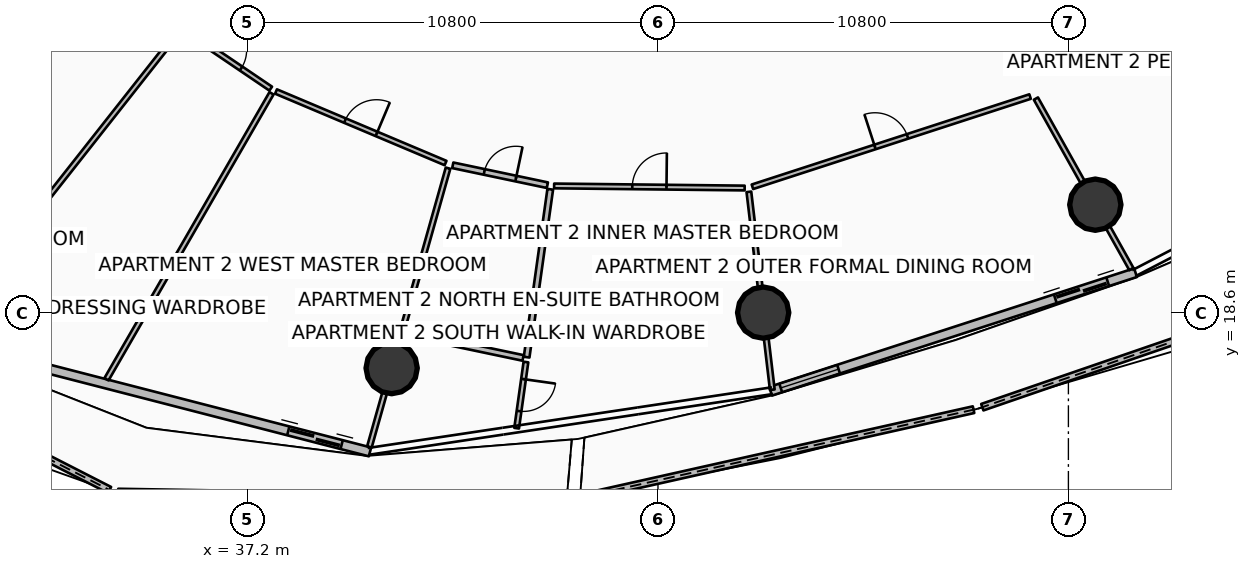
"""IFC4 building model, lengths in metres.
Left out: names, types, materials, properties, quantities, classifications, styles, units other than length and angle.
Written with IfcOpenShell. Run it as: python <this file> out.ifc"""

import sys

from ifc_helpers import new_model, si_unit, direction, frame, frame_2d, origin, origin_2d, place, context, subcontext, project, spatial, polyline, rectangle, circle, outline, extrude, element, fill, save


model = new_model("IFC4")
c1 = context("Model", 3, precision=1e-05, world=origin(), true_north=direction((0.0, 1.0)))
c2 = subcontext(c1, "Body", "Model", "MODEL_VIEW")
j1 = project(units=[si_unit("LENGTHUNIT", "METRE"), si_unit("PLANEANGLEUNIT", "RADIAN")], contexts=[c1])
p1 = place(None, origin())
s1 = spatial("IfcSite", under=j1, at=p1, CompositionType="ELEMENT")
p2 = place(p1, origin())
s2 = spatial("IfcBuilding", under=s1, at=p2, CompositionType="ELEMENT")
p3 = place(p2, frame((0.0, 0.0, 33.9)))
s3 = spatial("IfcBuildingStorey", under=s2, at=p3, CompositionType="ELEMENT", Elevation=33.9)
for number, where, z_axis, x_axis in (
    (1, (40.992, 17.151, 0.0), (0.0, 0.0, 1.0), (1.0, 0.0, 0.0)),
    (2, (50.768, 18.611, 0.0), (0.0, 0.0, 1.0), (1.0, 0.0, 0.0)),
    (3, (59.508, 21.45, 0.0), (0.0, 0.0, 1.0), (1.0, 0.0, 0.0)),
):
    element("IfcColumn", number, at=place(p3, frame(where, z_axis=z_axis, x_axis=x_axis)), inside=s3, PredefinedType="COLUMN", context=c2, shape_type="SweptSolid", body=[
        extrude(circle(Radius=0.675, at=origin_2d()), origin(), (0.0, 0.0, 1.0), 3.5),
    ])
p4 = place(p3, frame((22.246, 19.731, 0.0), z_axis=(0.0, 0.0, 1.0), x_axis=(0.890402176463, -0.455174652359, 0.0)))
e4 = element("IfcWall", 4, at=p4, inside=s3, PredefinedType="PARAPET", context=c2, shape_type="SweptSolid", body=[
    extrude(outline(polyline([(0.0, 0.0), (12.717, 0.0), (12.717, 1.348), (6.358, 1.562), (0.0, 1.747), (0.0, 0.0)])), frame((0.0, 0.09, 0.0), z_axis=(0.0, -1.0, 0.0), x_axis=(1.0, 0.0, 0.0)), (0.0, 0.0, 1.0), 0.18),
])
p5 = place(p3, frame((33.796, 13.886, 0.0), z_axis=(0.0, 0.0, 1.0), x_axis=(0.999855793441, -0.016982117721, 0.0)))
e5 = element("IfcWall", 5, at=p5, inside=s3, PredefinedType="PARAPET", context=c2, shape_type="SweptSolid", body=[
    extrude(outline(polyline([(0.0, 0.0), (11.803, 0.0), (11.803, 1.12), (5.902, 1.182), (0.0, 1.348), (0.0, 0.0)])), frame((0.0, 0.09, 0.0), z_axis=(0.0, -1.0, 0.0), x_axis=(1.0, 0.0, 0.0)), (0.0, 0.0, 1.0), 0.18),
])
p6 = place(p3, frame((45.949, 13.739, 0.0), z_axis=(0.0, 0.0, 1.0), x_axis=(0.975844238529, 0.218467439518, 0.0)))
e6 = element("IfcWall", 6, at=p6, inside=s3, PredefinedType="PARAPET", context=c2, shape_type="SweptSolid", body=[
    extrude(outline(polyline([(0.0, 0.0), (10.611, 0.0), (10.611, 1.348), (5.305, 1.182), (0.0, 1.12), (0.0, 0.0)])), frame((0.0, 0.09, 0.0), z_axis=(0.0, -1.0, 0.0), x_axis=(1.0, 0.0, 0.0)), (0.0, 0.0, 1.0), 0.18),
])
p7 = place(p3, frame((56.534, 16.122, 0.0), z_axis=(0.0, 0.0, 1.0), x_axis=(0.945564712315, 0.325434132851, 0.0)))
e7 = element("IfcWall", 7, at=p7, inside=s3, PredefinedType="PARAPET", context=c2, shape_type="SweptSolid", body=[
    extrude(outline(polyline([(0.0, 0.0), (10.897, 0.0), (10.897, 1.747), (5.448, 1.562), (0.0, 1.348), (0.0, 0.0)])), frame((0.0, 0.09, 0.0), z_axis=(0.0, -1.0, 0.0), x_axis=(1.0, 0.0, 0.0)), (0.0, 0.0, 1.0), 0.18),
])
p8 = place(p3, frame((28.946, 17.904, 0.0), z_axis=(0.0, 0.0, 1.0), x_axis=(0.96833871487, -0.249640007378, 0.0)))
e8 = element("IfcWall", 8, at=p8, inside=s3, PredefinedType="SOLIDWALL", context=c2, shape_type="SweptSolid", body=[
    extrude(rectangle(XDim=11.851, YDim=0.24, at=frame_2d((5.926, 0.0))), origin(), (0.0, 0.0, 1.0), 2.45),
])
p9 = place(p8, frame((9.631, 0.0, 0.0)))
e9 = element("IfcOpeningElement", 9, at=p9, cuts=e8, PredefinedType="OPENING", context=c2, shape_type="SweptSolid", body=[
    extrude(rectangle(XDim=1.45, YDim=2.15, at=frame_2d((0.725, 1.075))), frame((0.0, 0.13, 0.0), z_axis=(0.0, -1.0, 0.0), x_axis=(1.0, 0.0, 0.0)), (0.0, 0.0, 1.0), 0.26),
])
p10 = place(p8, frame((0.28, 0.0, 0.65)))
e10 = element("IfcOpeningElement", 10, at=p10, cuts=e8, PredefinedType="OPENING", context=c2, shape_type="SweptSolid", body=[
    extrude(rectangle(XDim=1.6, YDim=1.5, at=frame_2d((0.8, 0.75))), frame((0.0, 0.13, 0.0), z_axis=(0.0, -1.0, 0.0), x_axis=(1.0, 0.0, 0.0)), (0.0, 0.0, 1.0), 0.26),
])
p11 = place(p3, frame((50.964, 16.542, 0.0), z_axis=(0.0, 0.0, 1.0), x_axis=(0.951054679225, 0.309022648238, 0.0)))
e11 = element("IfcWall", 11, at=p11, inside=s3, PredefinedType="SOLIDWALL", context=c2, shape_type="SweptSolid", body=[
    extrude(rectangle(XDim=10.097, YDim=0.24, at=frame_2d((5.048, 0.0))), origin(), (0.0, 0.0, 1.0), 2.45),
])
p12 = place(p11, frame((7.877, 0.0, 0.0)))
e12 = element("IfcOpeningElement", 12, at=p12, cuts=e11, PredefinedType="OPENING", context=c2, shape_type="SweptSolid", body=[
    extrude(rectangle(XDim=1.45, YDim=2.15, at=frame_2d((0.725, 1.075))), frame((0.0, 0.13, 0.0), z_axis=(0.0, -1.0, 0.0), x_axis=(1.0, 0.0, 0.0)), (0.0, 0.0, 1.0), 0.26),
])
p13 = place(p11, frame((0.28, 0.0, 0.65)))
e13 = element("IfcOpeningElement", 13, at=p13, cuts=e11, PredefinedType="OPENING", context=c2, shape_type="SweptSolid", body=[
    extrude(rectangle(XDim=1.6, YDim=1.5, at=frame_2d((0.8, 0.75))), frame((0.0, 0.13, 0.0), z_axis=(0.0, -1.0, 0.0), x_axis=(1.0, 0.0, 0.0)), (0.0, 0.0, 1.0), 0.26),
])
p14 = place(p3, frame((33.291, 27.947, 0.0), z_axis=(0.0, 0.0, 1.0), x_axis=(-0.72304195697, -0.690804117287, 0.0)))
e14 = element("IfcWall", 14, at=p14, inside=s3, PredefinedType="PARTITIONING", context=c2, shape_type="SweptSolid", body=[
    extrude(rectangle(XDim=10.36, YDim=0.125, at=frame_2d((5.18, 0.0))), origin(), (0.0, 0.0, 1.0), 2.94),
])
p15 = place(p3, frame((35.4, 26.017, 0.0), z_axis=(0.0, 0.0, 1.0), x_axis=(-0.619085809847, -0.785323347447, 0.0)))
e15 = element("IfcWall", 15, at=p15, inside=s3, PredefinedType="PARTITIONING", context=c2, shape_type="SweptSolid", body=[
    extrude(rectangle(XDim=10.322, YDim=0.125, at=frame_2d((5.161, 0.0))), origin(), (0.0, 0.0, 1.0), 2.867),
])
p16 = place(p3, frame((37.831, 24.381, 0.0), z_axis=(0.0, 0.0, 1.0), x_axis=(-0.499878153527, -0.866095740451, 0.0)))
e16 = element("IfcWall", 16, at=p16, inside=s3, PredefinedType="PARTITIONING", context=c2, shape_type="SweptSolid", body=[
    extrude(rectangle(XDim=8.687, YDim=0.125, at=frame_2d((4.344, 0.0))), origin(), (0.0, 0.0, 1.0), 2.94),
])
p17 = place(p3, frame((35.544, 26.039, 0.0), z_axis=(0.0, 0.0, 1.0), x_axis=(0.827867904516, -0.560923107629, 0.0)))
e17 = element("IfcWall", 17, at=p17, inside=s3, PredefinedType="PARTITIONING", context=c2, shape_type="SweptSolid", body=[
    extrude(rectangle(XDim=2.736, YDim=0.125, at=frame_2d((1.368, 0.0))), origin(), (0.0, 0.0, 1.0), 2.867),
])
p18 = place(p17, frame((0.943, 0.0, 0.0)))
e18 = element("IfcOpeningElement", 18, at=p18, cuts=e17, PredefinedType="OPENING", context=c2, shape_type="SweptSolid", body=[
    extrude(rectangle(XDim=0.85, YDim=2.06, at=frame_2d((0.425, 1.03))), frame((0.0, 0.073, 0.0), z_axis=(0.0, -1.0, 0.0), x_axis=(1.0, 0.0, 0.0)), (0.0, 0.0, 1.0), 0.145),
])
p19 = place(p3, frame((37.949, 24.428, 0.0), z_axis=(0.0, 0.0, 1.0), x_axis=(0.921391247889, -0.388636293098, 0.0)))
e19 = element("IfcWall", 19, at=p19, inside=s3, PredefinedType="PARTITIONING", context=c2, shape_type="SweptSolid", body=[
    extrude(rectangle(XDim=4.842, YDim=0.125, at=frame_2d((2.421, 0.0))), origin(), (0.0, 0.0, 1.0), 2.867),
])
p20 = place(p19, frame((1.971, 0.0, 0.0)))
e20 = element("IfcOpeningElement", 20, at=p20, cuts=e19, PredefinedType="OPENING", context=c2, shape_type="SweptSolid", body=[
    extrude(rectangle(XDim=0.9, YDim=2.08, at=frame_2d((0.45, 1.04))), frame((0.0, 0.073, 0.0), z_axis=(0.0, -1.0, 0.0), x_axis=(1.0, 0.0, 0.0)), (0.0, 0.0, 1.0), 0.145),
])
p21 = place(p3, frame((42.475, 22.411, 0.0), z_axis=(0.0, 0.0, 1.0), x_axis=(-0.271439615814, -0.96245547168, 0.0)))
e21 = element("IfcWall", 21, at=p21, inside=s3, PredefinedType="PARTITIONING", context=c2, shape_type="SweptSolid", body=[
    extrude(rectangle(XDim=7.619, YDim=0.125, at=frame_2d((3.81, 0.0))), origin(), (0.0, 0.0, 1.0), 2.867),
])
p22 = place(p3, frame((42.6, 22.487, 0.0), z_axis=(0.0, 0.0, 1.0), x_axis=(0.978579306251, -0.20587020517, 0.0)))
e22 = element("IfcWall", 22, at=p22, inside=s3, PredefinedType="PARTITIONING", context=c2, shape_type="SweptSolid", body=[
    extrude(rectangle(XDim=2.544, YDim=0.15, at=frame_2d((1.272, 0.0))), origin(), (0.0, 0.0, 1.0), 2.867),
])
p23 = place(p22, frame((0.847, 0.0, 0.0)))
e23 = element("IfcOpeningElement", 23, at=p23, cuts=e22, PredefinedType="OPENING", context=c2, shape_type="SweptSolid", body=[
    extrude(rectangle(XDim=0.85, YDim=2.06, at=frame_2d((0.425, 1.03))), frame((0.0, 0.085, 0.0), z_axis=(0.0, -1.0, 0.0), x_axis=(1.0, 0.0, 0.0)), (0.0, 0.0, 1.0), 0.17),
])
p24 = place(p3, frame((41.354, 18.069, 0.0), z_axis=(0.0, 0.0, 1.0), x_axis=(0.978588253421, -0.205827671283, 0.0)))
e24 = element("IfcWall", 24, at=p24, inside=s3, PredefinedType="PARTITIONING", context=c2, shape_type="SweptSolid", body=[
    extrude(rectangle(XDim=3.163, YDim=0.15, at=frame_2d((1.582, 0.0))), origin(), (0.0, 0.0, 1.0), 2.867),
])
p25 = place(p3, frame((45.165, 21.855, 0.0), z_axis=(0.0, 0.0, 1.0), x_axis=(-0.139367219172, -0.990240767804, 0.0)))
e25 = element("IfcWall", 25, at=p25, inside=s3, PredefinedType="PARTITIONING", context=c2, shape_type="SweptSolid", body=[
    extrude(rectangle(XDim=4.46, YDim=0.15, at=frame_2d((2.23, 0.0))), origin(), (0.0, 0.0, 1.0), 2.94),
])
p26 = place(p3, frame((44.526, 17.31, 0.0), z_axis=(0.0, 0.0, 1.0), x_axis=(-0.139282491489, -0.990252688744, 0.0)))
e26 = element("IfcWall", 26, at=p26, inside=s3, PredefinedType="PARTITIONING", context=c2, shape_type="SweptSolid", body=[
    extrude(rectangle(XDim=1.758, YDim=0.125, at=frame_2d((0.879, 0.0))), origin(), (0.0, 0.0, 1.0), 2.94),
])
p27 = place(p26, frame((0.454, 0.0, 0.0)))
e27 = element("IfcOpeningElement", 27, at=p27, cuts=e26, PredefinedType="OPENING", context=c2, shape_type="SweptSolid", body=[
    extrude(rectangle(XDim=0.85, YDim=2.06, at=frame_2d((0.425, 1.03))), frame((0.0, 0.073, 0.0), z_axis=(0.0, -1.0, 0.0), x_axis=(1.0, 0.0, 0.0)), (0.0, 0.0, 1.0), 0.145),
])
p28 = place(p3, frame((45.268, 21.944, 0.0), z_axis=(0.0, 0.0, 1.0), x_axis=(0.999939426187, -0.011006541512, 0.0)))
e28 = element("IfcWall", 28, at=p28, inside=s3, PredefinedType="PARTITIONING", context=c2, shape_type="SweptSolid", body=[
    extrude(rectangle(XDim=5.013, YDim=0.125, at=frame_2d((2.506, 0.0))), origin(), (0.0, 0.0, 1.0), 2.94),
])
p29 = place(p28, frame((2.056, 0.0, 0.0)))
e29 = element("IfcOpeningElement", 29, at=p29, cuts=e28, PredefinedType="OPENING", context=c2, shape_type="SweptSolid", body=[
    extrude(rectangle(XDim=0.9, YDim=2.08, at=frame_2d((0.45, 1.04))), frame((0.0, 0.073, 0.0), z_axis=(0.0, -1.0, 0.0), x_axis=(1.0, 0.0, 0.0)), (0.0, 0.0, 1.0), 0.145),
])
p30 = place(p3, frame((50.392, 21.788, 0.0), z_axis=(0.0, 0.0, 1.0), x_axis=(0.11749238711, -0.993073783246, 0.0)))
e30 = element("IfcWall", 30, at=p30, inside=s3, PredefinedType="PARTITIONING", context=c2, shape_type="SweptSolid", body=[
    extrude(rectangle(XDim=5.243, YDim=0.125, at=frame_2d((2.621, 0.0))), origin(), (0.0, 0.0, 1.0), 2.867),
])
p31 = place(p3, frame((57.945, 24.242, 0.0), z_axis=(0.0, 0.0, 1.0), x_axis=(0.488630834306, -0.872490634772, 0.0)))
e31 = element("IfcWall", 31, at=p31, inside=s3, PredefinedType="PARTITIONING", context=c2, shape_type="SweptSolid", body=[
    extrude(rectangle(XDim=5.143, YDim=0.125, at=frame_2d((2.571, 0.0))), origin(), (0.0, 0.0, 1.0), 2.867),
])
p32 = place(p3, frame((50.485, 21.921, 0.0), z_axis=(0.0, 0.0, 1.0), x_axis=(0.951055318468, 0.309020680883, 0.0)))
e32 = element("IfcWall", 32, at=p32, inside=s3, PredefinedType="PARTITIONING", context=c2, shape_type="SweptSolid", body=[
    extrude(rectangle(XDim=7.682, YDim=0.125, at=frame_2d((3.841, 0.0))), origin(), (0.0, 0.0, 1.0), 2.867),
])
p33 = place(p32, frame((3.391, 0.0, 0.0)))
e33 = element("IfcOpeningElement", 33, at=p33, cuts=e32, PredefinedType="OPENING", context=c2, shape_type="SweptSolid", body=[
    extrude(rectangle(XDim=0.9, YDim=2.08, at=frame_2d((0.45, 1.04))), frame((0.0, 0.073, 0.0), z_axis=(0.0, -1.0, 0.0), x_axis=(1.0, 0.0, 0.0)), (0.0, 0.0, 1.0), 0.145),
])
p34 = place(p9, origin())
e34 = element("IfcDoor", 34, at=p34, inside=s3, OperationType="DOUBLE_DOOR_SLIDING", PredefinedType="DOOR", context=c2, shape_type="SweptSolid", body=[
    extrude(rectangle(XDim=1.45, YDim=2.15, at=frame_2d((0.725, 1.075))), frame((0.0, 0.025, 0.0), z_axis=(0.0, -1.0, 0.0), x_axis=(1.0, 0.0, 0.0)), (0.0, 0.0, 1.0), 0.05),
])
fill(e9, e34)
p35 = place(p12, origin())
e35 = element("IfcDoor", 35, at=p35, inside=s3, OperationType="DOUBLE_DOOR_SLIDING", PredefinedType="DOOR", context=c2, shape_type="SweptSolid", body=[
    extrude(rectangle(XDim=1.45, YDim=2.15, at=frame_2d((0.725, 1.075))), frame((0.0, 0.025, 0.0), z_axis=(0.0, -1.0, 0.0), x_axis=(1.0, 0.0, 0.0)), (0.0, 0.0, 1.0), 0.05),
])
fill(e12, e35)
p36 = place(p13, origin())
e36 = element("IfcWindow", 36, at=p36, inside=s3, PartitioningType="SINGLE_PANEL", PredefinedType="WINDOW", context=c2, shape_type="SweptSolid", body=[
    extrude(rectangle(XDim=1.6, YDim=1.5, at=frame_2d((0.8, 0.75))), frame((0.0, 0.03, 0.0), z_axis=(0.0, -1.0, 0.0), x_axis=(1.0, 0.0, 0.0)), (0.0, 0.0, 1.0), 0.06),
])
fill(e13, e36)
p37 = place(p18, origin())
e37 = element("IfcDoor", 37, at=p37, inside=s3, OperationType="SINGLE_SWING_LEFT", PredefinedType="DOOR", context=c2, shape_type="SweptSolid", body=[
    extrude(rectangle(XDim=0.85, YDim=2.06, at=frame_2d((0.425, 1.03))), frame((0.0, 0.025, 0.0), z_axis=(0.0, -1.0, 0.0), x_axis=(1.0, 0.0, 0.0)), (0.0, 0.0, 1.0), 0.05),
])
fill(e18, e37)
p38 = place(p20, origin())
e38 = element("IfcDoor", 38, at=p38, inside=s3, OperationType="SINGLE_SWING_RIGHT", PredefinedType="DOOR", context=c2, shape_type="SweptSolid", body=[
    extrude(rectangle(XDim=0.9, YDim=2.08, at=frame_2d((0.45, 1.04))), frame((0.0, 0.025, 0.0), z_axis=(0.0, -1.0, 0.0), x_axis=(1.0, 0.0, 0.0)), (0.0, 0.0, 1.0), 0.05),
])
fill(e20, e38)
p39 = place(p23, origin())
e39 = element("IfcDoor", 39, at=p39, inside=s3, OperationType="SINGLE_SWING_RIGHT", PredefinedType="DOOR", context=c2, shape_type="SweptSolid", body=[
    extrude(rectangle(XDim=0.85, YDim=2.06, at=frame_2d((0.425, 1.03))), frame((0.0, 0.025, 0.0), z_axis=(0.0, -1.0, 0.0), x_axis=(1.0, 0.0, 0.0)), (0.0, 0.0, 1.0), 0.05),
])
fill(e23, e39)
p40 = place(p27, origin())
e40 = element("IfcDoor", 40, at=p40, inside=s3, OperationType="SINGLE_SWING_LEFT", PredefinedType="DOOR", context=c2, shape_type="SweptSolid", body=[
    extrude(rectangle(XDim=0.85, YDim=2.06, at=frame_2d((0.425, 1.03))), frame((0.0, 0.025, 0.0), z_axis=(0.0, -1.0, 0.0), x_axis=(1.0, 0.0, 0.0)), (0.0, 0.0, 1.0), 0.05),
])
fill(e27, e40)
p41 = place(p29, origin())
e41 = element("IfcDoor", 41, at=p41, inside=s3, OperationType="SINGLE_SWING_RIGHT", PredefinedType="DOOR", context=c2, shape_type="SweptSolid", body=[
    extrude(rectangle(XDim=0.9, YDim=2.08, at=frame_2d((0.45, 1.04))), frame((0.0, 0.025, 0.0), z_axis=(0.0, -1.0, 0.0), x_axis=(1.0, 0.0, 0.0)), (0.0, 0.0, 1.0), 0.05),
])
fill(e29, e41)
p42 = place(p33, origin())
e42 = element("IfcDoor", 42, at=p42, inside=s3, OperationType="SINGLE_SWING_LEFT", PredefinedType="DOOR", context=c2, shape_type="SweptSolid", body=[
    extrude(rectangle(XDim=0.9, YDim=2.08, at=frame_2d((0.45, 1.04))), frame((0.0, 0.025, 0.0), z_axis=(0.0, -1.0, 0.0), x_axis=(1.0, 0.0, 0.0)), (0.0, 0.0, 1.0), 0.05),
])
fill(e33, e42)
save(model, sys.argv[1])
